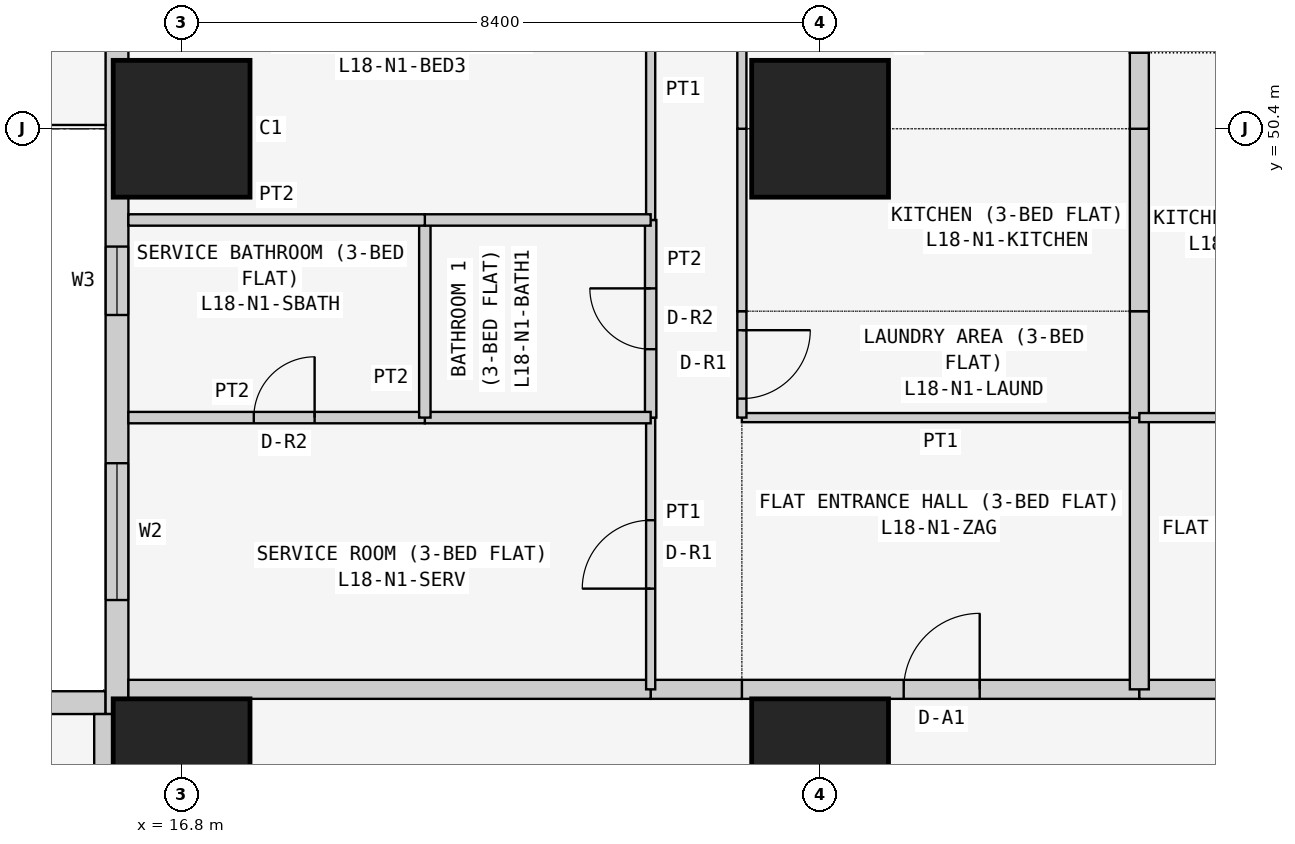
"""IFC4 building model, lengths in metres.
Left out: names, types, materials, properties, quantities, classifications, styles, units other than length and angle.
Written with IfcOpenShell. Run it as: python <this file> out.ifc"""

import sys

from ifc_helpers import new_model, si_unit, direction, frame, frame_2d, origin, origin_2d, place, context, subcontext, project, spatial, rectangle, extrude, element, fill, save


model = new_model("IFC4")
c1 = context("Model", 3, precision=1e-05, world=origin(), true_north=direction((0.0, 1.0)))
c2 = subcontext(c1, "Body", "Model", "MODEL_VIEW")
j1 = project(units=[si_unit("LENGTHUNIT", "METRE"), si_unit("PLANEANGLEUNIT", "RADIAN")], contexts=[c1])
p1 = place(None, origin())
s1 = spatial("IfcSite", under=j1, at=p1, CompositionType="ELEMENT")
p2 = place(p1, origin())
s2 = spatial("IfcBuilding", under=s1, at=p2, CompositionType="ELEMENT")
p3 = place(p2, frame((0.0, 0.0, 74.1)))
s3 = spatial("IfcBuildingStorey", under=s2, at=p3, CompositionType="ELEMENT", Elevation=74.1)
for number, where, z_axis, x_axis in (
    (1, (16.8, 42.0, 0.0), (0.0, 0.0, 1.0), (1.0, 0.0, 0.0)),
    (2, (16.8, 50.4, 0.0), (0.0, 0.0, 1.0), (1.0, 0.0, 0.0)),
    (3, (25.2, 42.0, 0.0), (0.0, 0.0, 1.0), (1.0, 0.0, 0.0)),
    (4, (25.2, 50.4, 0.0), (0.0, 0.0, 1.0), (1.0, 0.0, 0.0)),
):
    element("IfcColumn", number, at=place(p3, frame(where, z_axis=z_axis, x_axis=x_axis)), inside=s3, PredefinedType="COLUMN", context=c2, shape_type="SweptSolid", body=[
        extrude(rectangle(XDim=1.8, YDim=1.8, at=origin_2d()), origin(), (0.0, 0.0, 1.0), 3.6),
    ])
p4 = place(p3, frame((15.8, 42.85, 0.0), z_axis=(0.0, 0.0, 1.0), x_axis=(-1.0, 0.0, 0.0)))
e5 = element("IfcWall", 5, at=p4, inside=s3, PredefinedType="SOLIDWALL", context=c2, shape_type="SweptSolid", body=[
    extrude(rectangle(XDim=15.4, YDim=0.3, at=frame_2d((7.7, 0.0))), origin(), (0.0, 0.0, 1.0), 3.45),
])
p5 = place(p4, frame((1.2, 0.0, 0.9)))
e6 = element("IfcOpeningElement", 6, at=p5, cuts=e5, PredefinedType="OPENING", context=c2, shape_type="SweptSolid", body=[
    extrude(rectangle(XDim=1.8, YDim=1.5, at=frame_2d((0.9, 0.75))), frame((0.0, 0.16, 0.0), z_axis=(0.0, -1.0, 0.0), x_axis=(1.0, 0.0, 0.0)), (0.0, 0.0, 1.0), 0.32),
])
p6 = place(p4, frame((4.95, 0.0, 1.5)))
e7 = element("IfcOpeningElement", 7, at=p6, cuts=e5, PredefinedType="OPENING", context=c2, shape_type="SweptSolid", body=[
    extrude(rectangle(XDim=0.9, YDim=0.7, at=frame_2d((0.45, 0.35))), frame((0.0, 0.16, 0.0), z_axis=(0.0, -1.0, 0.0), x_axis=(1.0, 0.0, 0.0)), (0.0, 0.0, 1.0), 0.32),
])
p7 = place(p4, frame((8.5, 0.0, 0.9)))
e8 = element("IfcOpeningElement", 8, at=p7, cuts=e5, PredefinedType="OPENING", context=c2, shape_type="SweptSolid", body=[
    extrude(rectangle(XDim=1.8, YDim=1.5, at=frame_2d((0.9, 0.75))), frame((0.0, 0.16, 0.0), z_axis=(0.0, -1.0, 0.0), x_axis=(1.0, 0.0, 0.0)), (0.0, 0.0, 1.0), 0.32),
])
p8 = place(p4, frame((12.5, 0.0, 0.0)))
e9 = element("IfcOpeningElement", 9, at=p8, cuts=e5, PredefinedType="OPENING", context=c2, shape_type="SweptSolid", body=[
    extrude(rectangle(XDim=0.9, YDim=2.4, at=frame_2d((0.45, 1.2))), frame((0.0, 0.16, 0.0), z_axis=(0.0, -1.0, 0.0), x_axis=(1.0, 0.0, 0.0)), (0.0, 0.0, 1.0), 0.32),
])
p9 = place(p4, frame((13.5, 0.0, 0.9)))
e10 = element("IfcOpeningElement", 10, at=p9, cuts=e5, PredefinedType="OPENING", context=c2, shape_type="SweptSolid", body=[
    extrude(rectangle(XDim=1.2, YDim=1.5, at=frame_2d((0.6, 0.75))), frame((0.0, 0.16, 0.0), z_axis=(0.0, -1.0, 0.0), x_axis=(1.0, 0.0, 0.0)), (0.0, 0.0, 1.0), 0.32),
])
p10 = place(p3, frame((15.95, 58.4, 0.0), z_axis=(0.0, 0.0, 1.0), x_axis=(0.0, -1.0, 0.0)))
e11 = element("IfcWall", 11, at=p10, inside=s3, PredefinedType="SOLIDWALL", context=c2, shape_type="SweptSolid", body=[
    extrude(rectangle(XDim=15.7, YDim=0.3, at=frame_2d((7.85, 0.0))), origin(), (0.0, 0.0, 1.0), 3.45),
])
p11 = place(p10, frame((12.4, 0.0, 0.9)))
e12 = element("IfcOpeningElement", 12, at=p11, cuts=e11, PredefinedType="OPENING", context=c2, shape_type="SweptSolid", body=[
    extrude(rectangle(XDim=1.8, YDim=1.5, at=frame_2d((0.9, 0.75))), frame((0.0, 0.16, 0.0), z_axis=(0.0, -1.0, 0.0), x_axis=(1.0, 0.0, 0.0)), (0.0, 0.0, 1.0), 0.32),
])
p12 = place(p10, frame((9.55, 0.0, 1.5)))
e13 = element("IfcOpeningElement", 13, at=p12, cuts=e11, PredefinedType="OPENING", context=c2, shape_type="SweptSolid", body=[
    extrude(rectangle(XDim=0.9, YDim=0.7, at=frame_2d((0.45, 0.35))), frame((0.0, 0.16, 0.0), z_axis=(0.0, -1.0, 0.0), x_axis=(1.0, 0.0, 0.0)), (0.0, 0.0, 1.0), 0.32),
])
p13 = place(p10, frame((5.1, 0.0, 0.9)))
e14 = element("IfcOpeningElement", 14, at=p13, cuts=e11, PredefinedType="OPENING", context=c2, shape_type="SweptSolid", body=[
    extrude(rectangle(XDim=1.8, YDim=1.5, at=frame_2d((0.9, 0.75))), frame((0.0, 0.16, 0.0), z_axis=(0.0, -1.0, 0.0), x_axis=(1.0, 0.0, 0.0)), (0.0, 0.0, 1.0), 0.32),
])
p14 = place(p10, frame((2.0, 0.0, 0.0)))
e15 = element("IfcOpeningElement", 15, at=p14, cuts=e11, PredefinedType="OPENING", context=c2, shape_type="SweptSolid", body=[
    extrude(rectangle(XDim=0.9, YDim=2.4, at=frame_2d((0.45, 1.2))), frame((0.0, 0.16, 0.0), z_axis=(0.0, -1.0, 0.0), x_axis=(1.0, 0.0, 0.0)), (0.0, 0.0, 1.0), 0.32),
])
p15 = place(p10, frame((0.7, 0.0, 0.9)))
e16 = element("IfcOpeningElement", 16, at=p15, cuts=e11, PredefinedType="OPENING", context=c2, shape_type="SweptSolid", body=[
    extrude(rectangle(XDim=1.2, YDim=1.5, at=frame_2d((0.6, 0.75))), frame((0.0, 0.16, 0.0), z_axis=(0.0, -1.0, 0.0), x_axis=(1.0, 0.0, 0.0)), (0.0, 0.0, 1.0), 0.32),
])
p16 = place(p3, frame((24.171, 43.025, 0.0), z_axis=(0.0, 0.0, 1.0), x_axis=(1.0, 0.0, 0.0)))
e17 = element("IfcWall", 17, at=p16, inside=s3, PredefinedType="PARTITIONING", context=c2, shape_type="SweptSolid", body=[
    extrude(rectangle(XDim=5.229, YDim=0.25, at=frame_2d((2.615, 0.0))), origin(), (0.0, 0.0, 1.0), 3.45),
])
p17 = place(p16, frame((2.129, 0.0, 0.0)))
e18 = element("IfcOpeningElement", 18, at=p17, cuts=e17, PredefinedType="OPENING", context=c2, shape_type="SweptSolid", body=[
    extrude(rectangle(XDim=1.0, YDim=2.1, at=frame_2d((0.5, 1.05))), frame((0.0, 0.135, 0.0), z_axis=(0.0, -1.0, 0.0), x_axis=(1.0, 0.0, 0.0)), (0.0, 0.0, 1.0), 0.27),
])
p18 = place(p3, frame((22.971, 43.025, 0.0), z_axis=(0.0, 0.0, 1.0), x_axis=(1.0, 0.0, 0.0)))
e19 = element("IfcWall", 19, at=p18, inside=s3, PredefinedType="PARTITIONING", context=c2, shape_type="SweptSolid", body=[
    extrude(rectangle(XDim=1.2, YDim=0.25, at=frame_2d((0.6, 0.0))), origin(), (0.0, 0.0, 1.0), 3.45),
])
p19 = place(p3, frame((16.1, 43.025, 0.0), z_axis=(0.0, 0.0, 1.0), x_axis=(1.0, 0.0, 0.0)))
e20 = element("IfcWall", 20, at=p19, inside=s3, PredefinedType="PARTITIONING", context=c2, shape_type="SweptSolid", body=[
    extrude(rectangle(XDim=6.871, YDim=0.25, at=frame_2d((3.436, 0.0))), origin(), (0.0, 0.0, 1.0), 3.45),
])
p20 = place(p3, frame((29.4, 43.025, 0.0), z_axis=(0.0, 0.0, 1.0), x_axis=(1.0, 0.0, 0.0)))
e21 = element("IfcWall", 21, at=p20, inside=s3, PredefinedType="PARTITIONING", context=c2, shape_type="SweptSolid", body=[
    extrude(rectangle(XDim=5.229, YDim=0.25, at=frame_2d((2.615, 0.0))), origin(), (0.0, 0.0, 1.0), 3.45),
])
p21 = place(p20, frame((2.1, 0.0, 0.0)))
e22 = element("IfcOpeningElement", 22, at=p21, cuts=e21, PredefinedType="OPENING", context=c2, shape_type="SweptSolid", body=[
    extrude(rectangle(XDim=1.0, YDim=2.1, at=frame_2d((0.5, 1.05))), frame((0.0, 0.135, 0.0), z_axis=(0.0, -1.0, 0.0), x_axis=(1.0, 0.0, 0.0)), (0.0, 0.0, 1.0), 0.27),
])
p22 = place(p3, frame((15.775, 36.229, 0.0), z_axis=(0.0, 0.0, 1.0), x_axis=(0.0, 1.0, 0.0)))
e23 = element("IfcWall", 23, at=p22, inside=s3, PredefinedType="PARTITIONING", context=c2, shape_type="SweptSolid", body=[
    extrude(rectangle(XDim=6.471, YDim=0.25, at=frame_2d((3.235, 0.0))), origin(), (0.0, 0.0, 1.0), 3.45),
])
p23 = place(p3, frame((29.4, 46.6, 0.0), z_axis=(0.0, 0.0, 1.0), x_axis=(-1.0, 0.0, 0.0)))
e24 = element("IfcWall", 24, at=p23, inside=s3, PredefinedType="PARTITIONING", context=c2, shape_type="SweptSolid", body=[
    extrude(rectangle(XDim=5.229, YDim=0.12, at=frame_2d((2.615, 0.0))), origin(), (0.0, 0.0, 1.0), 3.45),
])
p24 = place(p3, frame((29.4, 43.025, 0.0), z_axis=(0.0, 0.0, 1.0), x_axis=(0.0, 1.0, 0.0)))
e25 = element("IfcWall", 25, at=p24, inside=s3, PredefinedType="PARTITIONING", context=c2, shape_type="SweptSolid", body=[
    extrude(rectangle(XDim=3.575, YDim=0.25, at=frame_2d((1.788, 0.0))), origin(), (0.0, 0.0, 1.0), 2.848),
])
p25 = place(p3, frame((24.171, 48.0, 0.0), z_axis=(0.0, 0.0, 1.0), x_axis=(0.0, -1.0, 0.0)))
e26 = element("IfcWall", 26, at=p25, inside=s3, PredefinedType="PARTITIONING", context=c2, shape_type="SweptSolid", body=[
    extrude(rectangle(XDim=1.4, YDim=0.12, at=frame_2d((0.7, 0.0))), origin(), (0.0, 0.0, 1.0), 3.45),
])
p26 = place(p25, frame((0.25, 0.0, 0.0)))
e27 = element("IfcOpeningElement", 27, at=p26, cuts=e26, PredefinedType="OPENING", context=c2, shape_type="SweptSolid", body=[
    extrude(rectangle(XDim=0.9, YDim=2.1, at=frame_2d((0.45, 1.05))), frame((0.0, 0.07, 0.0), z_axis=(0.0, -1.0, 0.0), x_axis=(1.0, 0.0, 0.0)), (0.0, 0.0, 1.0), 0.14),
])
p27 = place(p3, frame((29.4, 46.6, 0.0), z_axis=(0.0, 0.0, 1.0), x_axis=(0.0, 1.0, 0.0)))
e28 = element("IfcWall", 28, at=p27, inside=s3, PredefinedType="PARTITIONING", context=c2, shape_type="SweptSolid", body=[
    extrude(rectangle(XDim=1.4, YDim=0.25, at=frame_2d((0.7, 0.0))), origin(), (0.0, 0.0, 1.0), 2.848),
])
p28 = place(p3, frame((24.171, 50.4, 0.0), z_axis=(0.0, 0.0, 1.0), x_axis=(0.0, -1.0, 0.0)))
e29 = element("IfcWall", 29, at=p28, inside=s3, PredefinedType="PARTITIONING", context=c2, shape_type="SweptSolid", body=[
    extrude(rectangle(XDim=2.4, YDim=0.12, at=frame_2d((1.2, 0.0))), origin(), (0.0, 0.0, 1.0), 3.45),
])
p29 = place(p3, frame((29.4, 48.0, 0.0), z_axis=(0.0, 0.0, 1.0), x_axis=(0.0, 1.0, 0.0)))
e30 = element("IfcWall", 30, at=p29, inside=s3, PredefinedType="PARTITIONING", context=c2, shape_type="SweptSolid", body=[
    extrude(rectangle(XDim=2.4, YDim=0.25, at=frame_2d((1.2, 0.0))), origin(), (0.0, 0.0, 1.0), 2.848),
])
p30 = place(p3, frame((24.171, 55.3, 0.0), z_axis=(0.0, 0.0, 1.0), x_axis=(0.0, -1.0, 0.0)))
e31 = element("IfcWall", 31, at=p30, inside=s3, PredefinedType="PARTITIONING", context=c2, shape_type="SweptSolid", body=[
    extrude(rectangle(XDim=4.9, YDim=0.12, at=frame_2d((2.45, 0.0))), origin(), (0.0, 0.0, 1.0), 3.45),
])
p31 = place(p30, frame((1.25, 0.0, 0.0)))
e32 = element("IfcOpeningElement", 32, at=p31, cuts=e31, PredefinedType="OPENING", context=c2, shape_type="SweptSolid", body=[
    extrude(rectangle(XDim=0.9, YDim=2.1, at=frame_2d((0.45, 1.05))), frame((0.0, 0.07, 0.0), z_axis=(0.0, -1.0, 0.0), x_axis=(1.0, 0.0, 0.0)), (0.0, 0.0, 1.0), 0.14),
])
p32 = place(p3, frame((29.4, 50.4, 0.0), z_axis=(0.0, 0.0, 1.0), x_axis=(0.0, 1.0, 0.0)))
e33 = element("IfcWall", 33, at=p32, inside=s3, PredefinedType="PARTITIONING", context=c2, shape_type="SweptSolid", body=[
    extrude(rectangle(XDim=1.0, YDim=0.25, at=frame_2d((0.5, 0.0))), origin(), (0.0, 0.0, 1.0), 2.848),
])
p33 = place(p3, frame((29.4, 51.4, 0.0), z_axis=(0.0, 0.0, 1.0), x_axis=(0.0, 1.0, 0.0)))
e34 = element("IfcWall", 34, at=p33, inside=s3, PredefinedType="PARTITIONING", context=c2, shape_type="SweptSolid", body=[
    extrude(rectangle(XDim=8.05, YDim=0.25, at=frame_2d((4.025, 0.0))), origin(), (0.0, 0.0, 1.0), 2.848),
])
p34 = place(p3, frame((22.971, 46.6, 0.0), z_axis=(0.0, 0.0, 1.0), x_axis=(0.0, -1.0, 0.0)))
e35 = element("IfcWall", 35, at=p34, inside=s3, PredefinedType="PARTITIONING", context=c2, shape_type="SweptSolid", body=[
    extrude(rectangle(XDim=3.575, YDim=0.12, at=frame_2d((1.788, 0.0))), origin(), (0.0, 0.0, 1.0), 3.45),
])
p35 = place(p34, frame((1.35, 0.0, 0.0)))
e36 = element("IfcOpeningElement", 36, at=p35, cuts=e35, PredefinedType="OPENING", context=c2, shape_type="SweptSolid", body=[
    extrude(rectangle(XDim=0.9, YDim=2.1, at=frame_2d((0.45, 1.05))), frame((0.0, 0.07, 0.0), z_axis=(0.0, -1.0, 0.0), x_axis=(1.0, 0.0, 0.0)), (0.0, 0.0, 1.0), 0.14),
])
p36 = place(p3, frame((22.971, 49.2, 0.0), z_axis=(0.0, 0.0, 1.0), x_axis=(0.0, -1.0, 0.0)))
e37 = element("IfcWall", 37, at=p36, inside=s3, PredefinedType="PARTITIONING", context=c2, shape_type="SweptSolid", body=[
    extrude(rectangle(XDim=2.6, YDim=0.15, at=frame_2d((1.3, 0.0))), origin(), (0.0, 0.0, 1.0), 3.45),
])
p37 = place(p36, frame((0.9, 0.0, 0.0)))
e38 = element("IfcOpeningElement", 38, at=p37, cuts=e37, PredefinedType="OPENING", context=c2, shape_type="SweptSolid", body=[
    extrude(rectangle(XDim=0.8, YDim=2.1, at=frame_2d((0.4, 1.05))), frame((0.0, 0.085, 0.0), z_axis=(0.0, -1.0, 0.0), x_axis=(1.0, 0.0, 0.0)), (0.0, 0.0, 1.0), 0.17),
])
p38 = place(p3, frame((22.971, 54.1, 0.0), z_axis=(0.0, 0.0, 1.0), x_axis=(0.0, -1.0, 0.0)))
e39 = element("IfcWall", 39, at=p38, inside=s3, PredefinedType="PARTITIONING", context=c2, shape_type="SweptSolid", body=[
    extrude(rectangle(XDim=4.9, YDim=0.12, at=frame_2d((2.45, 0.0))), origin(), (0.0, 0.0, 1.0), 3.45),
])
p39 = place(p38, frame((1.65, 0.0, 0.0)))
e40 = element("IfcOpeningElement", 40, at=p39, cuts=e39, PredefinedType="OPENING", context=c2, shape_type="SweptSolid", body=[
    extrude(rectangle(XDim=0.9, YDim=2.1, at=frame_2d((0.45, 1.05))), frame((0.0, 0.07, 0.0), z_axis=(0.0, -1.0, 0.0), x_axis=(1.0, 0.0, 0.0)), (0.0, 0.0, 1.0), 0.14),
])
p40 = place(p3, frame((22.971, 46.6, 0.0), z_axis=(0.0, 0.0, 1.0), x_axis=(-1.0, 0.0, 0.0)))
e41 = element("IfcWall", 41, at=p40, inside=s3, PredefinedType="PARTITIONING", context=c2, shape_type="SweptSolid", body=[
    extrude(rectangle(XDim=2.971, YDim=0.15, at=frame_2d((1.485, 0.0))), origin(), (0.0, 0.0, 1.0), 3.45),
])
p41 = place(p3, frame((20.0, 46.6, 0.0), z_axis=(0.0, 0.0, 1.0), x_axis=(-1.0, 0.0, 0.0)))
e42 = element("IfcWall", 42, at=p41, inside=s3, PredefinedType="PARTITIONING", context=c2, shape_type="SweptSolid", body=[
    extrude(rectangle(XDim=3.9, YDim=0.15, at=frame_2d((1.95, 0.0))), origin(), (0.0, 0.0, 1.0), 3.45),
])
p42 = place(p41, frame((1.45, 0.0, 0.0)))
e43 = element("IfcOpeningElement", 43, at=p42, cuts=e42, PredefinedType="OPENING", context=c2, shape_type="SweptSolid", body=[
    extrude(rectangle(XDim=0.8, YDim=2.1, at=frame_2d((0.4, 1.05))), frame((0.0, 0.085, 0.0), z_axis=(0.0, -1.0, 0.0), x_axis=(1.0, 0.0, 0.0)), (0.0, 0.0, 1.0), 0.17),
])
p43 = place(p3, frame((20.0, 49.2, 0.0), z_axis=(0.0, 0.0, 1.0), x_axis=(0.0, -1.0, 0.0)))
e44 = element("IfcWall", 44, at=p43, inside=s3, PredefinedType="PARTITIONING", context=c2, shape_type="SweptSolid", body=[
    extrude(rectangle(XDim=2.6, YDim=0.15, at=frame_2d((1.3, 0.0))), origin(), (0.0, 0.0, 1.0), 3.45),
])
p44 = place(p3, frame((22.971, 49.2, 0.0), z_axis=(0.0, 0.0, 1.0), x_axis=(-1.0, 0.0, 0.0)))
e45 = element("IfcWall", 45, at=p44, inside=s3, PredefinedType="PARTITIONING", context=c2, shape_type="SweptSolid", body=[
    extrude(rectangle(XDim=2.971, YDim=0.15, at=frame_2d((1.485, 0.0))), origin(), (0.0, 0.0, 1.0), 3.45),
])
p45 = place(p3, frame((20.0, 49.2, 0.0), z_axis=(0.0, 0.0, 1.0), x_axis=(-1.0, 0.0, 0.0)))
e46 = element("IfcWall", 46, at=p45, inside=s3, PredefinedType="PARTITIONING", context=c2, shape_type="SweptSolid", body=[
    extrude(rectangle(XDim=3.9, YDim=0.15, at=frame_2d((1.95, 0.0))), origin(), (0.0, 0.0, 1.0), 3.45),
])
p46 = place(p3, frame((29.4, 46.6, 0.0), z_axis=(0.0, 0.0, 1.0), x_axis=(1.0, 0.0, 0.0)))
e47 = element("IfcWall", 47, at=p46, inside=s3, PredefinedType="PARTITIONING", context=c2, shape_type="SweptSolid", body=[
    extrude(rectangle(XDim=5.229, YDim=0.12, at=frame_2d((2.615, 0.0))), origin(), (0.0, 0.0, 1.0), 3.45),
])
p47 = place(p46, frame((1.05, 0.0, 0.0)))
e48 = element("IfcOpeningElement", 48, at=p47, cuts=e47, PredefinedType="OPENING", context=c2, shape_type="SweptSolid", body=[
    extrude(rectangle(XDim=0.9, YDim=2.1, at=frame_2d((0.45, 1.05))), frame((0.0, 0.07, 0.0), z_axis=(0.0, -1.0, 0.0), x_axis=(1.0, 0.0, 0.0)), (0.0, 0.0, 1.0), 0.14),
])
p48 = place(p11, origin())
e49 = element("IfcWindow", 49, at=p48, inside=s3, PartitioningType="SINGLE_PANEL", PredefinedType="WINDOW", context=c2, shape_type="SweptSolid", body=[
    extrude(rectangle(XDim=1.8, YDim=1.5, at=frame_2d((0.9, 0.75))), frame((0.0, 0.03, 0.0), z_axis=(0.0, -1.0, 0.0), x_axis=(1.0, 0.0, 0.0)), (0.0, 0.0, 1.0), 0.06),
])
fill(e12, e49)
p49 = place(p12, origin())
e50 = element("IfcWindow", 50, at=p49, inside=s3, PartitioningType="SINGLE_PANEL", PredefinedType="WINDOW", context=c2, shape_type="SweptSolid", body=[
    extrude(rectangle(XDim=0.9, YDim=0.7, at=frame_2d((0.45, 0.35))), frame((0.0, 0.03, 0.0), z_axis=(0.0, -1.0, 0.0), x_axis=(1.0, 0.0, 0.0)), (0.0, 0.0, 1.0), 0.06),
])
fill(e13, e50)
p50 = place(p17, origin())
e51 = element("IfcDoor", 51, at=p50, inside=s3, OperationType="SINGLE_SWING_RIGHT", PredefinedType="DOOR", context=c2, shape_type="SweptSolid", body=[
    extrude(rectangle(XDim=1.0, YDim=2.1, at=frame_2d((0.5, 1.05))), frame((0.0, 0.025, 0.0), z_axis=(0.0, -1.0, 0.0), x_axis=(1.0, 0.0, 0.0)), (0.0, 0.0, 1.0), 0.05),
])
fill(e18, e51)
p51 = place(p26, origin())
e52 = element("IfcDoor", 52, at=p51, inside=s3, OperationType="SINGLE_SWING_LEFT", PredefinedType="DOOR", context=c2, shape_type="SweptSolid", body=[
    extrude(rectangle(XDim=0.9, YDim=2.1, at=frame_2d((0.45, 1.05))), frame((0.0, 0.025, 0.0), z_axis=(0.0, -1.0, 0.0), x_axis=(1.0, 0.0, 0.0)), (0.0, 0.0, 1.0), 0.05),
])
fill(e27, e52)
p52 = place(p35, frame((0.9, 0.0, 0.0), z_axis=(0.0, 0.0, 1.0), x_axis=(-1.0, 0.0, 0.0)))
e53 = element("IfcDoor", 53, at=p52, inside=s3, OperationType="SINGLE_SWING_LEFT", PredefinedType="DOOR", context=c2, shape_type="SweptSolid", body=[
    extrude(rectangle(XDim=0.9, YDim=2.1, at=frame_2d((0.45, 1.05))), frame((0.0, 0.025, 0.0), z_axis=(0.0, -1.0, 0.0), x_axis=(1.0, 0.0, 0.0)), (0.0, 0.0, 1.0), 0.05),
])
fill(e36, e53)
p53 = place(p42, frame((0.8, 0.0, 0.0), z_axis=(0.0, 0.0, 1.0), x_axis=(-1.0, 0.0, 0.0)))
e54 = element("IfcDoor", 54, at=p53, inside=s3, OperationType="SINGLE_SWING_RIGHT", PredefinedType="DOOR", context=c2, shape_type="SweptSolid", body=[
    extrude(rectangle(XDim=0.8, YDim=2.1, at=frame_2d((0.4, 1.05))), frame((0.0, 0.025, 0.0), z_axis=(0.0, -1.0, 0.0), x_axis=(1.0, 0.0, 0.0)), (0.0, 0.0, 1.0), 0.05),
])
fill(e43, e54)
p54 = place(p37, frame((0.8, 0.0, 0.0), z_axis=(0.0, 0.0, 1.0), x_axis=(-1.0, 0.0, 0.0)))
e55 = element("IfcDoor", 55, at=p54, inside=s3, OperationType="SINGLE_SWING_RIGHT", PredefinedType="DOOR", context=c2, shape_type="SweptSolid", body=[
    extrude(rectangle(XDim=0.8, YDim=2.1, at=frame_2d((0.4, 1.05))), frame((0.0, 0.025, 0.0), z_axis=(0.0, -1.0, 0.0), x_axis=(1.0, 0.0, 0.0)), (0.0, 0.0, 1.0), 0.05),
])
fill(e38, e55)
save(model, sys.argv[1])
